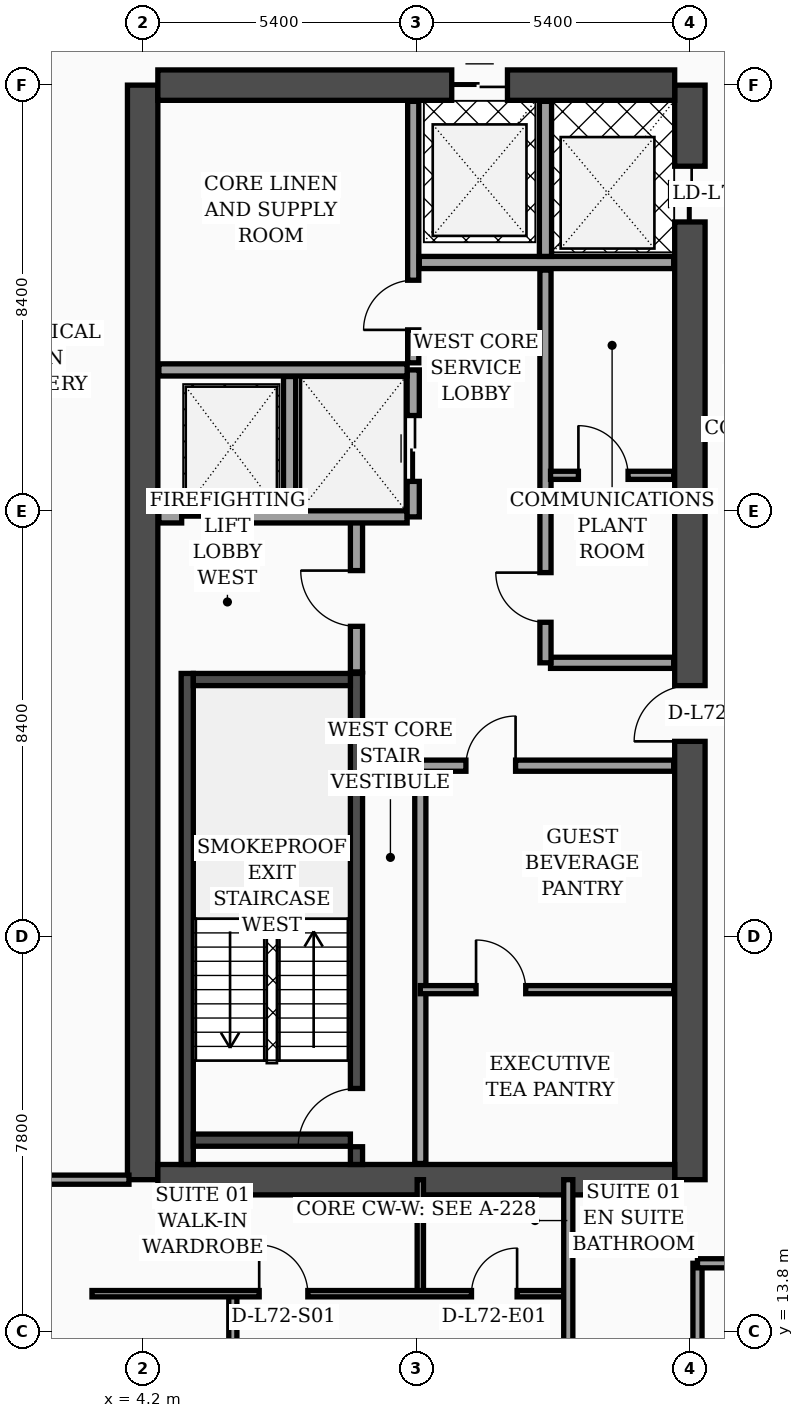
"""IFC4 building model, lengths in metres.
Left out: names, types, materials, properties, quantities, classifications, styles, units other than length and angle.
Written with IfcOpenShell. Run it as: python <this file> out.ifc"""

import sys

from ifc_helpers import new_model, si_unit, direction, frame, frame_2d, origin, place, context, subcontext, project, spatial, rectangle, extrude, element, fill, save


model = new_model("IFC4")
c1 = context("Model", 3, precision=1e-05, world=origin(), true_north=direction((0.0, 1.0)))
c2 = subcontext(c1, "Body", "Model", "MODEL_VIEW")
j1 = project(units=[si_unit("LENGTHUNIT", "METRE"), si_unit("PLANEANGLEUNIT", "RADIAN")], contexts=[c1])
p1 = place(None, origin())
s1 = spatial("IfcSite", under=j1, at=p1, CompositionType="ELEMENT")
p2 = place(p1, origin())
s2 = spatial("IfcBuilding", under=s1, at=p2, CompositionType="ELEMENT")
p3 = place(p2, frame((0.0, 0.0, 291.1)))
s3 = spatial("IfcBuildingStorey", under=s2, at=p3, CompositionType="ELEMENT", Elevation=291.1)
p4 = place(p3, frame((4.2, 16.8, 0.0), z_axis=(0.0, 0.0, 1.0), x_axis=(0.0, 1.0, 0.0)))
e1 = element("IfcWall", 1, at=p4, inside=s3, PredefinedType="SHEAR", context=c2, shape_type="SweptSolid", body=[
    extrude(rectangle(XDim=21.6, YDim=0.6, at=frame_2d((10.8, 0.0))), origin(), (0.0, 0.0, 1.0), 3.56),
])
p5 = place(p3, frame((15.0, 16.8, 0.0), z_axis=(0.0, 0.0, 1.0), x_axis=(0.0, 1.0, 0.0)))
e2 = element("IfcWall", 2, at=p5, inside=s3, PredefinedType="SHEAR", context=c2, shape_type="SweptSolid", body=[
    extrude(rectangle(XDim=21.6, YDim=0.6, at=frame_2d((10.8, 0.0))), origin(), (0.0, 0.0, 1.0), 3.56),
])
p6 = place(p5, frame((8.65, 0.0, 0.0)))
e3 = element("IfcOpeningElement", 3, at=p6, cuts=e2, PredefinedType="OPENING", context=c2, shape_type="SweptSolid", body=[
    extrude(rectangle(XDim=1.1, YDim=2.2, at=frame_2d((0.55, 1.1))), frame((0.0, 0.31, 0.0), z_axis=(0.0, -1.0, 0.0), x_axis=(1.0, 0.0, 0.0)), (0.0, 0.0, 1.0), 0.62),
])
p7 = place(p5, frame((18.9, 0.0, 0.0)))
e4 = element("IfcOpeningElement", 4, at=p7, cuts=e2, PredefinedType="OPENING", context=c2, shape_type="SweptSolid", body=[
    extrude(rectangle(XDim=1.1, YDim=2.2, at=frame_2d((0.55, 1.1))), frame((0.0, 0.31, 0.0), z_axis=(0.0, -1.0, 0.0), x_axis=(1.0, 0.0, 0.0)), (0.0, 0.0, 1.0), 0.62),
])
p8 = place(p3, frame((4.5, 38.4, 0.0), z_axis=(0.0, 0.0, 1.0), x_axis=(1.0, 0.0, 0.0)))
e5 = element("IfcWall", 5, at=p8, inside=s3, PredefinedType="SHEAR", context=c2, shape_type="SweptSolid", body=[
    extrude(rectangle(XDim=10.2, YDim=0.6, at=frame_2d((5.1, 0.0))), origin(), (0.0, 0.0, 1.0), 3.56),
])
p9 = place(p8, frame((5.8, 0.0, 0.0)))
e6 = element("IfcOpeningElement", 6, at=p9, cuts=e5, PredefinedType="OPENING", context=c2, shape_type="SweptSolid", body=[
    extrude(rectangle(XDim=1.1, YDim=2.2, at=frame_2d((0.55, 1.1))), frame((0.0, 0.31, 0.0), z_axis=(0.0, -1.0, 0.0), x_axis=(1.0, 0.0, 0.0)), (0.0, 0.0, 1.0), 0.62),
])
p10 = place(p3, frame((4.5, 16.8, 0.0), z_axis=(0.0, 0.0, 1.0), x_axis=(1.0, 0.0, 0.0)))
e7 = element("IfcWall", 7, at=p10, inside=s3, PredefinedType="SHEAR", context=c2, shape_type="SweptSolid", body=[
    extrude(rectangle(XDim=10.2, YDim=0.6, at=frame_2d((5.1, 0.0))), origin(), (0.0, 0.0, 1.0), 3.56),
])
p11 = place(p3, frame((5.08, 17.1, 0.0), z_axis=(0.0, 0.0, 1.0), x_axis=(0.0, 1.0, 0.0)))
e8 = element("IfcWall", 8, at=p11, inside=s3, PredefinedType="SOLIDWALL", context=c2, shape_type="SweptSolid", body=[
    extrude(rectangle(XDim=9.69, YDim=0.24, at=frame_2d((4.845, 0.0))), origin(), (0.0, 0.0, 1.0), 3.56),
])
p12 = place(p3, frame((8.42, 17.1, 0.0), z_axis=(0.0, 0.0, 1.0), x_axis=(0.0, 1.0, 0.0)))
e9 = element("IfcWall", 9, at=p12, inside=s3, PredefinedType="SOLIDWALL", context=c2, shape_type="SweptSolid", body=[
    extrude(rectangle(XDim=9.69, YDim=0.24, at=frame_2d((4.845, 0.0))), origin(), (0.0, 0.0, 1.0), 3.56),
])
p13 = place(p12, frame((0.35, 0.0, 0.0)))
e10 = element("IfcOpeningElement", 10, at=p13, cuts=e9, PredefinedType="OPENING", context=c2, shape_type="SweptSolid", body=[
    extrude(rectangle(XDim=1.15, YDim=2.2, at=frame_2d((0.575, 1.1))), frame((0.0, 0.13, 0.0), z_axis=(0.0, -1.0, 0.0), x_axis=(1.0, 0.0, 0.0)), (0.0, 0.0, 1.0), 0.26),
])
for number, where, z_axis, x_axis in (
    (11, (5.2, 17.58, 0.0), (0.0, 0.0, 1.0), (1.0, 0.0, 0.0)),
    (12, (5.2, 26.67, 0.0), (0.0, 0.0, 1.0), (1.0, 0.0, 0.0)),
):
    element("IfcWall", number, at=place(p3, frame(where, z_axis=z_axis, x_axis=x_axis)), inside=s3, PredefinedType="SOLIDWALL", context=c2, shape_type="SweptSolid", body=[
        extrude(rectangle(XDim=3.1, YDim=0.24, at=frame_2d((1.55, 0.0))), origin(), (0.0, 0.0, 1.0), 3.56),
    ])
p14 = place(p3, frame((8.42, 26.82, 0.0), z_axis=(0.0, 0.0, 1.0), x_axis=(0.0, 1.0, 0.0)))
e13 = element("IfcWall", 13, at=p14, inside=s3, PredefinedType="SOLIDWALL", context=c2, shape_type="SweptSolid", body=[
    extrude(rectangle(XDim=3.0, YDim=0.24, at=frame_2d((1.5, 0.0))), origin(), (0.0, 0.0, 1.0), 3.56),
])
p15 = place(p14, frame((0.9, 0.0, 0.0)))
e14 = element("IfcOpeningElement", 14, at=p15, cuts=e13, PredefinedType="OPENING", context=c2, shape_type="SweptSolid", body=[
    extrude(rectangle(XDim=1.1, YDim=2.2, at=frame_2d((0.55, 1.1))), frame((0.0, 0.13, 0.0), z_axis=(0.0, -1.0, 0.0), x_axis=(1.0, 0.0, 0.0)), (0.0, 0.0, 1.0), 0.26),
])
p16 = place(p3, frame((4.52, 29.88, 0.0), z_axis=(0.0, 0.0, 1.0), x_axis=(1.0, 0.0, 0.0)))
e15 = element("IfcWall", 15, at=p16, inside=s3, PredefinedType="SOLIDWALL", context=c2, shape_type="SweptSolid", body=[
    extrude(rectangle(XDim=4.9, YDim=0.24, at=frame_2d((2.45, 0.0))), origin(), (0.0, 0.0, 1.0), 3.56),
])
p17 = place(p16, frame((0.45, 0.0, 0.0)))
e16 = element("IfcOpeningElement", 16, at=p17, cuts=e15, PredefinedType="OPENING", context=c2, shape_type="SweptSolid", body=[
    extrude(rectangle(XDim=1.3, YDim=2.35, at=frame_2d((0.65, 1.175))), frame((0.0, 0.13, 0.0), z_axis=(0.0, -1.0, 0.0), x_axis=(1.0, 0.0, 0.0)), (0.0, 0.0, 1.0), 0.26),
])
p18 = place(p3, frame((7.1, 30.02, 0.0), z_axis=(0.0, 0.0, 1.0), x_axis=(0.0, 1.0, 0.0)))
e17 = element("IfcWall", 17, at=p18, inside=s3, PredefinedType="SOLIDWALL", context=c2, shape_type="SweptSolid", body=[
    extrude(rectangle(XDim=2.63, YDim=0.24, at=frame_2d((1.315, 0.0))), origin(), (0.0, 0.0, 1.0), 3.56),
])
p19 = place(p3, frame((9.54, 29.88, 0.0), z_axis=(0.0, 0.0, 1.0), x_axis=(0.0, 1.0, 0.0)))
e18 = element("IfcWall", 18, at=p19, inside=s3, PredefinedType="SOLIDWALL", context=c2, shape_type="SweptSolid", body=[
    extrude(rectangle(XDim=2.9, YDim=0.24, at=frame_2d((1.45, 0.0))), origin(), (0.0, 0.0, 1.0), 3.56),
])
p20 = place(p19, frame((0.7, 0.0, 0.0)))
e19 = element("IfcOpeningElement", 19, at=p20, cuts=e18, PredefinedType="OPENING", context=c2, shape_type="SweptSolid", body=[
    extrude(rectangle(XDim=1.3, YDim=2.35, at=frame_2d((0.65, 1.175))), frame((0.0, 0.13, 0.0), z_axis=(0.0, -1.0, 0.0), x_axis=(1.0, 0.0, 0.0)), (0.0, 0.0, 1.0), 0.26),
])
p21 = place(p3, frame((4.52, 32.78, 0.0), z_axis=(0.0, 0.0, 1.0), x_axis=(1.0, 0.0, 0.0)))
e20 = element("IfcWall", 20, at=p21, inside=s3, PredefinedType="SOLIDWALL", context=c2, shape_type="SweptSolid", body=[
    extrude(rectangle(XDim=4.9, YDim=0.24, at=frame_2d((2.45, 0.0))), origin(), (0.0, 0.0, 1.0), 3.19),
])
p22 = place(p3, frame((9.68, 17.12, 0.0), z_axis=(0.0, 0.0, 1.0), x_axis=(0.0, 1.0, 0.0)))
e21 = element("IfcWall", 21, at=p22, inside=s3, PredefinedType="SOLIDWALL", context=c2, shape_type="SweptSolid", body=[
    extrude(rectangle(XDim=7.88, YDim=0.22, at=frame_2d((3.94, 0.0))), origin(), (0.0, 0.0, 1.0), 3.56),
])
p23 = place(p3, frame((9.54, 32.92, 0.0), z_axis=(0.0, 0.0, 1.0), x_axis=(0.0, 1.0, 0.0)))
e22 = element("IfcWall", 22, at=p23, inside=s3, PredefinedType="SOLIDWALL", context=c2, shape_type="SweptSolid", body=[
    extrude(rectangle(XDim=5.16, YDim=0.22, at=frame_2d((2.58, 0.0))), origin(), (0.0, 0.0, 1.0), 3.56),
])
p24 = place(p23, frame((0.65, 0.0, 0.0)))
e23 = element("IfcOpeningElement", 23, at=p24, cuts=e22, PredefinedType="OPENING", context=c2, shape_type="SweptSolid", body=[
    extrude(rectangle(XDim=0.98, YDim=2.15, at=frame_2d((0.49, 1.075))), frame((0.0, 0.12, 0.0), z_axis=(0.0, -1.0, 0.0), x_axis=(1.0, 0.0, 0.0)), (0.0, 0.0, 1.0), 0.24),
])
p25 = place(p3, frame((9.68, 20.55, 0.0), z_axis=(0.0, 0.0, 1.0), x_axis=(1.0, 0.0, 0.0)))
e24 = element("IfcWall", 24, at=p25, inside=s3, PredefinedType="PARTITIONING", context=c2, shape_type="SweptSolid", body=[
    extrude(rectangle(XDim=5.0, YDim=0.16, at=frame_2d((2.5, 0.0))), origin(), (0.0, 0.0, 1.0), 3.56),
])
p26 = place(p25, frame((1.1, 0.0, 0.0)))
e25 = element("IfcOpeningElement", 25, at=p26, cuts=e24, PredefinedType="OPENING", context=c2, shape_type="SweptSolid", body=[
    extrude(rectangle(XDim=0.98, YDim=2.15, at=frame_2d((0.49, 1.075))), frame((0.0, 0.09, 0.0), z_axis=(0.0, -1.0, 0.0), x_axis=(1.0, 0.0, 0.0)), (0.0, 0.0, 1.0), 0.18),
])
p27 = place(p3, frame((9.68, 24.97, 0.0), z_axis=(0.0, 0.0, 1.0), x_axis=(1.0, 0.0, 0.0)))
e26 = element("IfcWall", 26, at=p27, inside=s3, PredefinedType="SOLIDWALL", context=c2, shape_type="SweptSolid", body=[
    extrude(rectangle(XDim=5.0, YDim=0.22, at=frame_2d((2.5, 0.0))), origin(), (0.0, 0.0, 1.0), 2.99),
])
p28 = place(p27, frame((0.9, 0.0, 0.0)))
e27 = element("IfcOpeningElement", 27, at=p28, cuts=e26, PredefinedType="OPENING", context=c2, shape_type="SweptSolid", body=[
    extrude(rectangle(XDim=0.98, YDim=2.15, at=frame_2d((0.49, 1.075))), frame((0.0, 0.12, 0.0), z_axis=(0.0, -1.0, 0.0), x_axis=(1.0, 0.0, 0.0)), (0.0, 0.0, 1.0), 0.24),
])
p29 = place(p3, frame((12.25, 27.0, 0.0), z_axis=(0.0, 0.0, 1.0), x_axis=(1.0, 0.0, 0.0)))
e28 = element("IfcWall", 28, at=p29, inside=s3, PredefinedType="SOLIDWALL", context=c2, shape_type="SweptSolid", body=[
    extrude(rectangle(XDim=2.43, YDim=0.22, at=frame_2d((1.215, 0.0))), origin(), (0.0, 0.0, 1.0), 3.56),
])
p30 = place(p3, frame((12.15, 27.0, 0.0), z_axis=(0.0, 0.0, 1.0), x_axis=(0.0, 1.0, 0.0)))
e29 = element("IfcWall", 29, at=p30, inside=s3, PredefinedType="SOLIDWALL", context=c2, shape_type="SweptSolid", body=[
    extrude(rectangle(XDim=7.75, YDim=0.22, at=frame_2d((3.875, 0.0))), origin(), (0.0, 0.0, 1.0), 3.56),
])
p31 = place(p30, frame((0.8, 0.0, 0.0)))
e30 = element("IfcOpeningElement", 30, at=p31, cuts=e29, PredefinedType="OPENING", context=c2, shape_type="SweptSolid", body=[
    extrude(rectangle(XDim=0.98, YDim=2.15, at=frame_2d((0.49, 1.075))), frame((0.0, 0.12, 0.0), z_axis=(0.0, -1.0, 0.0), x_axis=(1.0, 0.0, 0.0)), (0.0, 0.0, 1.0), 0.24),
])
p32 = place(p3, frame((12.25, 30.7, 0.0), z_axis=(0.0, 0.0, 1.0), x_axis=(1.0, 0.0, 0.0)))
e31 = element("IfcWall", 31, at=p32, inside=s3, PredefinedType="PARTITIONING", context=c2, shape_type="SweptSolid", body=[
    extrude(rectangle(XDim=2.43, YDim=0.16, at=frame_2d((1.215, 0.0))), origin(), (0.0, 0.0, 1.0), 3.56),
])
p33 = place(p32, frame((0.55, 0.0, 0.0)))
e32 = element("IfcOpeningElement", 32, at=p33, cuts=e31, PredefinedType="OPENING", context=c2, shape_type="SweptSolid", body=[
    extrude(rectangle(XDim=0.98, YDim=2.15, at=frame_2d((0.49, 1.075))), frame((0.0, 0.09, 0.0), z_axis=(0.0, -1.0, 0.0), x_axis=(1.0, 0.0, 0.0)), (0.0, 0.0, 1.0), 0.18),
])
p34 = place(p3, frame((9.66, 34.9, 0.0), z_axis=(0.0, 0.0, 1.0), x_axis=(1.0, 0.0, 0.0)))
e33 = element("IfcWall", 33, at=p34, inside=s3, PredefinedType="SOLIDWALL", context=c2, shape_type="SweptSolid", body=[
    extrude(rectangle(XDim=5.02, YDim=0.24, at=frame_2d((2.51, 0.0))), origin(), (0.0, 0.0, 1.0), 3.56),
])
p35 = place(p3, frame((12.15, 35.02, 0.0), z_axis=(0.0, 0.0, 1.0), x_axis=(0.0, 1.0, 0.0)))
e34 = element("IfcWall", 34, at=p35, inside=s3, PredefinedType="SOLIDWALL", context=c2, shape_type="SweptSolid", body=[
    extrude(rectangle(XDim=3.06, YDim=0.24, at=frame_2d((1.53, 0.0))), origin(), (0.0, 0.0, 1.0), 3.56),
])
p36 = place(p3, frame((0.08, 16.8, 0.0), z_axis=(0.0, 0.0, 1.0), x_axis=(1.0, 0.0, 0.0)))
e35 = element("IfcWall", 35, at=p36, inside=s3, PredefinedType="PARTITIONING", context=c2, shape_type="SweptSolid", body=[
    extrude(rectangle(XDim=3.85, YDim=0.18, at=frame_2d((1.925, 0.0))), origin(), (0.0, 0.0, 1.0), 2.99),
])
p37 = place(p3, frame((9.68, 14.55, 0.0), z_axis=(0.0, 0.0, 1.0), x_axis=(0.0, 1.0, 0.0)))
e36 = element("IfcWall", 36, at=p37, inside=s3, PredefinedType="PARTITIONING", context=c2, shape_type="SweptSolid", body=[
    extrude(rectangle(XDim=2.25, YDim=0.125, at=frame_2d((1.125, 0.0))), origin(), (0.0, 0.0, 1.0), 3.56),
])
p38 = place(p3, frame((5.98, 2.44, 0.0), z_axis=(0.0, 0.0, 1.0), x_axis=(0.0, 1.0, 0.0)))
e37 = element("IfcWall", 37, at=p38, inside=s3, PredefinedType="PARTITIONING", context=c2, shape_type="SweptSolid", body=[
    extrude(rectangle(XDim=12.11, YDim=0.16, at=frame_2d((6.055, 0.0))), origin(), (0.0, 0.0, 1.0), 3.09),
])
p39 = place(p38, frame((5.58, 0.0, 0.0)))
e38 = element("IfcOpeningElement", 38, at=p39, cuts=e37, PredefinedType="OPENING", context=c2, shape_type="SweptSolid", body=[
    extrude(rectangle(XDim=0.96, YDim=2.2, at=frame_2d((0.48, 1.1))), frame((0.0, 0.09, 0.0), z_axis=(0.0, -1.0, 0.0), x_axis=(1.0, 0.0, 0.0)), (0.0, 0.0, 1.0), 0.18),
])
p40 = place(p3, frame((3.2, 14.55, 0.0), z_axis=(0.0, 0.0, 1.0), x_axis=(1.0, 0.0, 0.0)))
e39 = element("IfcWall", 39, at=p40, inside=s3, PredefinedType="PARTITIONING", context=c2, shape_type="SweptSolid", body=[
    extrude(rectangle(XDim=9.4, YDim=0.125, at=frame_2d((4.7, 0.0))), origin(), (0.0, 0.0, 1.0), 2.99),
])
p41 = place(p40, frame((3.3, 0.0, 0.0)))
e40 = element("IfcOpeningElement", 40, at=p41, cuts=e39, PredefinedType="OPENING", context=c2, shape_type="SweptSolid", body=[
    extrude(rectangle(XDim=0.96, YDim=2.2, at=frame_2d((0.48, 1.1))), frame((0.0, 0.073, 0.0), z_axis=(0.0, -1.0, 0.0), x_axis=(1.0, 0.0, 0.0)), (0.0, 0.0, 1.0), 0.145),
])
p42 = place(p40, frame((7.49, 0.0, 0.0)))
e41 = element("IfcOpeningElement", 41, at=p42, cuts=e39, PredefinedType="OPENING", context=c2, shape_type="SweptSolid", body=[
    extrude(rectangle(XDim=0.9, YDim=2.15, at=frame_2d((0.45, 1.075))), frame((0.0, 0.073, 0.0), z_axis=(0.0, -1.0, 0.0), x_axis=(1.0, 0.0, 0.0)), (0.0, 0.0, 1.0), 0.145),
])
p43 = place(p3, frame((12.6, 2.44, 0.0), z_axis=(0.0, 0.0, 1.0), x_axis=(0.0, 1.0, 0.0)))
e42 = element("IfcWall", 42, at=p43, inside=s3, PredefinedType="PARTITIONING", context=c2, shape_type="SweptSolid", body=[
    extrude(rectangle(XDim=14.36, YDim=0.18, at=frame_2d((7.18, 0.0))), origin(), (0.0, 0.0, 1.0), 2.99),
])
p44 = place(p43, frame((3.01, 0.0, 0.0)))
e43 = element("IfcOpeningElement", 43, at=p44, cuts=e42, PredefinedType="OPENING", context=c2, shape_type="SweptSolid", body=[
    extrude(rectangle(XDim=1.02, YDim=2.2, at=frame_2d((0.51, 1.1))), frame((0.0, 0.1, 0.0), z_axis=(0.0, -1.0, 0.0), x_axis=(1.0, 0.0, 0.0)), (0.0, 0.0, 1.0), 0.2),
])
p45 = place(p3, frame((15.15, 2.44, 0.0), z_axis=(0.0, 0.0, 1.0), x_axis=(0.0, 1.0, 0.0)))
e44 = element("IfcWall", 44, at=p45, inside=s3, PredefinedType="PARTITIONING", context=c2, shape_type="SweptSolid", body=[
    extrude(rectangle(XDim=12.71, YDim=0.18, at=frame_2d((6.355, 0.0))), origin(), (0.0, 0.0, 1.0), 3.09),
])
p46 = place(p3, frame((15.15, 15.15, 0.0), z_axis=(0.0, 0.0, 1.0), x_axis=(1.0, 0.0, 0.0)))
e45 = element("IfcWall", 45, at=p46, inside=s3, PredefinedType="PARTITIONING", context=c2, shape_type="SweptSolid", body=[
    extrude(rectangle(XDim=6.45, YDim=0.18, at=frame_2d((3.225, 0.0))), origin(), (0.0, 0.0, 1.0), 2.59),
])
p47 = place(p46, frame((1.74, 0.0, 0.0)))
e46 = element("IfcOpeningElement", 46, at=p47, cuts=e45, PredefinedType="OPENING", context=c2, shape_type="SweptSolid", body=[
    extrude(rectangle(XDim=1.02, YDim=2.2, at=frame_2d((0.51, 1.1))), frame((0.0, 0.1, 0.0), z_axis=(0.0, -1.0, 0.0), x_axis=(1.0, 0.0, 0.0)), (0.0, 0.0, 1.0), 0.2),
])
p48 = place(p15, origin())
e47 = element("IfcDoor", 47, at=p48, inside=s3, OperationType="SINGLE_SWING_RIGHT", PredefinedType="DOOR", context=c2, shape_type="SweptSolid", body=[
    extrude(rectangle(XDim=1.1, YDim=2.2, at=frame_2d((0.55, 1.1))), frame((0.0, 0.025, 0.0), z_axis=(0.0, -1.0, 0.0), x_axis=(1.0, 0.0, 0.0)), (0.0, 0.0, 1.0), 0.05),
])
fill(e14, e47)
p49 = place(p17, origin())
e48 = element("IfcDoor", 48, at=p49, inside=s3, OperationType="DOUBLE_DOOR_SLIDING", PredefinedType="DOOR", context=c2, shape_type="SweptSolid", body=[
    extrude(rectangle(XDim=1.3, YDim=2.35, at=frame_2d((0.65, 1.175))), frame((0.0, 0.025, 0.0), z_axis=(0.0, -1.0, 0.0), x_axis=(1.0, 0.0, 0.0)), (0.0, 0.0, 1.0), 0.05),
])
fill(e16, e48)
p50 = place(p20, origin())
e49 = element("IfcDoor", 49, at=p50, inside=s3, OperationType="DOUBLE_DOOR_SLIDING", PredefinedType="DOOR", context=c2, shape_type="SweptSolid", body=[
    extrude(rectangle(XDim=1.3, YDim=2.35, at=frame_2d((0.65, 1.175))), frame((0.0, 0.025, 0.0), z_axis=(0.0, -1.0, 0.0), x_axis=(1.0, 0.0, 0.0)), (0.0, 0.0, 1.0), 0.05),
])
fill(e19, e49)
p51 = place(p24, origin())
e50 = element("IfcDoor", 50, at=p51, inside=s3, OperationType="SINGLE_SWING_LEFT", PredefinedType="DOOR", context=c2, shape_type="SweptSolid", body=[
    extrude(rectangle(XDim=0.98, YDim=2.15, at=frame_2d((0.49, 1.075))), frame((0.0, 0.025, 0.0), z_axis=(0.0, -1.0, 0.0), x_axis=(1.0, 0.0, 0.0)), (0.0, 0.0, 1.0), 0.05),
])
fill(e23, e50)
p52 = place(p26, origin())
e51 = element("IfcDoor", 51, at=p52, inside=s3, OperationType="SINGLE_SWING_LEFT", PredefinedType="DOOR", context=c2, shape_type="SweptSolid", body=[
    extrude(rectangle(XDim=0.98, YDim=2.15, at=frame_2d((0.49, 1.075))), frame((0.0, 0.025, 0.0), z_axis=(0.0, -1.0, 0.0), x_axis=(1.0, 0.0, 0.0)), (0.0, 0.0, 1.0), 0.05),
])
fill(e25, e51)
p53 = place(p28, origin())
e52 = element("IfcDoor", 52, at=p53, inside=s3, OperationType="SINGLE_SWING_RIGHT", PredefinedType="DOOR", context=c2, shape_type="SweptSolid", body=[
    extrude(rectangle(XDim=0.98, YDim=2.15, at=frame_2d((0.49, 1.075))), frame((0.0, 0.025, 0.0), z_axis=(0.0, -1.0, 0.0), x_axis=(1.0, 0.0, 0.0)), (0.0, 0.0, 1.0), 0.05),
])
fill(e27, e52)
p54 = place(p31, origin())
e53 = element("IfcDoor", 53, at=p54, inside=s3, OperationType="SINGLE_SWING_RIGHT", PredefinedType="DOOR", context=c2, shape_type="SweptSolid", body=[
    extrude(rectangle(XDim=0.98, YDim=2.15, at=frame_2d((0.49, 1.075))), frame((0.0, 0.025, 0.0), z_axis=(0.0, -1.0, 0.0), x_axis=(1.0, 0.0, 0.0)), (0.0, 0.0, 1.0), 0.05),
])
fill(e30, e53)
p55 = place(p33, origin())
e54 = element("IfcDoor", 54, at=p55, inside=s3, OperationType="SINGLE_SWING_LEFT", PredefinedType="DOOR", context=c2, shape_type="SweptSolid", body=[
    extrude(rectangle(XDim=0.98, YDim=2.15, at=frame_2d((0.49, 1.075))), frame((0.0, 0.025, 0.0), z_axis=(0.0, -1.0, 0.0), x_axis=(1.0, 0.0, 0.0)), (0.0, 0.0, 1.0), 0.05),
])
fill(e32, e54)
p56 = place(p41, origin())
e55 = element("IfcDoor", 55, at=p56, inside=s3, OperationType="SINGLE_SWING_LEFT", PredefinedType="DOOR", context=c2, shape_type="SweptSolid", body=[
    extrude(rectangle(XDim=0.96, YDim=2.2, at=frame_2d((0.48, 1.1))), frame((0.0, 0.025, 0.0), z_axis=(0.0, -1.0, 0.0), x_axis=(1.0, 0.0, 0.0)), (0.0, 0.0, 1.0), 0.05),
])
fill(e40, e55)
p57 = place(p42, origin())
e56 = element("IfcDoor", 56, at=p57, inside=s3, OperationType="SINGLE_SWING_RIGHT", PredefinedType="DOOR", context=c2, shape_type="SweptSolid", body=[
    extrude(rectangle(XDim=0.9, YDim=2.15, at=frame_2d((0.45, 1.075))), frame((0.0, 0.025, 0.0), z_axis=(0.0, -1.0, 0.0), x_axis=(1.0, 0.0, 0.0)), (0.0, 0.0, 1.0), 0.05),
])
fill(e41, e56)
p58 = place(p13, origin())
e57 = element("IfcDoor", 57, at=p58, inside=s3, OperationType="SINGLE_SWING_LEFT", PredefinedType="DOOR", context=c2, shape_type="SweptSolid", body=[
    extrude(rectangle(XDim=1.15, YDim=2.2, at=frame_2d((0.575, 1.1))), frame((0.0, 0.025, 0.0), z_axis=(0.0, -1.0, 0.0), x_axis=(1.0, 0.0, 0.0)), (0.0, 0.0, 1.0), 0.05),
])
fill(e10, e57)
p59 = place(p6, origin())
e58 = element("IfcDoor", 58, at=p59, inside=s3, OperationType="SINGLE_SWING_LEFT", PredefinedType="DOOR", context=c2, shape_type="SweptSolid", body=[
    extrude(rectangle(XDim=1.1, YDim=2.2, at=frame_2d((0.55, 1.1))), frame((0.0, 0.025, 0.0), z_axis=(0.0, -1.0, 0.0), x_axis=(1.0, 0.0, 0.0)), (0.0, 0.0, 1.0), 0.05),
])
fill(e3, e58)
p60 = place(p7, origin())
e59 = element("IfcDoor", 59, at=p60, inside=s3, OperationType="DOUBLE_DOOR_SLIDING", PredefinedType="DOOR", context=c2, shape_type="SweptSolid", body=[
    extrude(rectangle(XDim=1.1, YDim=2.2, at=frame_2d((0.55, 1.1))), frame((0.0, 0.025, 0.0), z_axis=(0.0, -1.0, 0.0), x_axis=(1.0, 0.0, 0.0)), (0.0, 0.0, 1.0), 0.05),
])
fill(e4, e59)
p61 = place(p9, origin())
e60 = element("IfcDoor", 60, at=p61, inside=s3, OperationType="DOUBLE_DOOR_SLIDING", PredefinedType="DOOR", context=c2, shape_type="SweptSolid", body=[
    extrude(rectangle(XDim=1.1, YDim=2.2, at=frame_2d((0.55, 1.1))), frame((0.0, 0.025, 0.0), z_axis=(0.0, -1.0, 0.0), x_axis=(1.0, 0.0, 0.0)), (0.0, 0.0, 1.0), 0.05),
])
fill(e6, e60)
save(model, sys.argv[1])
